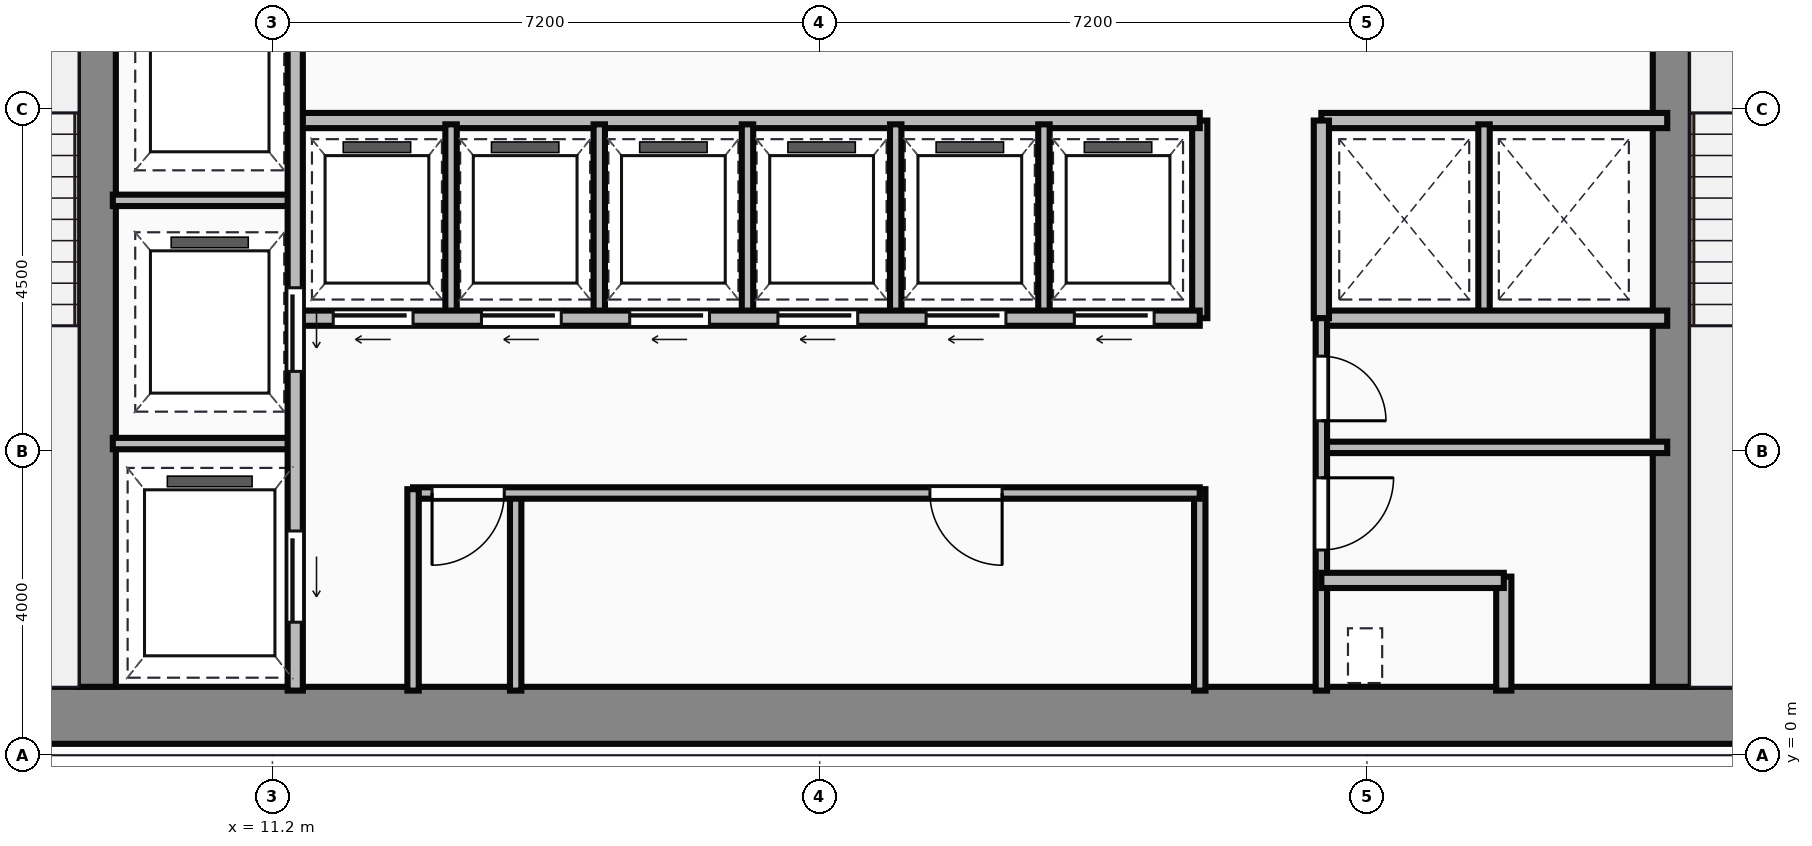
"""IFC4 building model, lengths in metres.
Left out: names, types, materials, properties, quantities, classifications, styles, units other than length and angle.
Written with IfcOpenShell. Run it as: python <this file> out.ifc"""

import sys

from ifc_helpers import new_model, si_unit, direction, frame, frame_2d, origin, place, context, subcontext, project, spatial, rectangle, extrude, source, transform, mapped, element, fill, save


model = new_model("IFC4")
c1 = context("Model", 3, precision=1e-05, world=origin(), true_north=direction((0.0, 1.0)))
c2 = subcontext(c1, "Body", "Model", "MODEL_VIEW")
j1 = project(units=[si_unit("LENGTHUNIT", "METRE"), si_unit("PLANEANGLEUNIT", "RADIAN")], contexts=[c1])
p1 = place(None, origin())
s1 = spatial("IfcSite", under=j1, at=p1, CompositionType="ELEMENT")
p2 = place(p1, origin())
s2 = spatial("IfcBuilding", under=s1, at=p2, CompositionType="ELEMENT")
p3 = place(p2, frame((0.0, 0.0, 117.85)))
s3 = spatial("IfcBuildingStorey", under=s2, at=p3, CompositionType="ELEMENT", Elevation=117.85)
m1 = source(origin(), c2, "Body", "SweptSolid", [
    extrude(rectangle(XDim=29.5, YDim=0.75, at=frame_2d((14.75, 0.0))), origin(), (0.0, 0.0, 1.0), 3.65),
])
p4 = place(p3, frame((4.5, 0.525, 0.0), z_axis=(0.0, 0.0, 1.0), x_axis=(1.0, 0.0, 0.0)))
e1 = element("IfcWall", 1, at=p4, inside=s3, PredefinedType="SHEAR", context=c2, shape_type="MappedRepresentation", body=[
    mapped(m1, transform((0.0, 0.0, 0.0))),
])
m2 = source(origin(), c2, "Body", "SweptSolid", [
    extrude(rectangle(XDim=12.35, YDim=0.5, at=frame_2d((6.175, 0.0))), origin(), (0.0, 0.0, 1.0), 3.65),
])
for number, where, z_axis, x_axis in (
    (2, (8.89, 0.9, 0.0), (0.0, 0.0, 1.0), (0.0, 1.0, 0.0)),
    (3, (29.61, 0.9, 0.0), (0.0, 0.0, 1.0), (0.0, 1.0, 0.0)),
):
    element("IfcWall", number, at=place(p3, frame(where, z_axis=z_axis, x_axis=x_axis)), inside=s3, PredefinedType="SHEAR", context=c2, shape_type="MappedRepresentation", body=[
        mapped(m2, transform((0.0, 0.0, 0.0))),
    ])
m3 = source(origin(), c2, "Body", "SweptSolid", [
    extrude(rectangle(XDim=9.6, YDim=0.2, at=frame_2d((4.8, 0.0))), origin(), (0.0, 0.0, 1.0), 3.4),
])
p5 = place(p3, frame((11.5, 0.85, 0.0), z_axis=(0.0, 0.0, 1.0), x_axis=(0.0, 1.0, 0.0)))
e4 = element("IfcWall", 4, at=p5, inside=s3, PredefinedType="PARTITIONING", context=c2, shape_type="MappedRepresentation", body=[
    mapped(m3, transform((0.0, 0.0, 0.0))),
])
p6 = place(p5, frame((4.2, 0.0, 0.0)))
e5 = element("IfcOpeningElement", 5, at=p6, cuts=e4, PredefinedType="OPENING", context=c2, shape_type="SweptSolid", body=[
    extrude(rectangle(XDim=1.1, YDim=2.15, at=frame_2d((0.55, 1.075))), frame((0.0, 0.11, 0.0), z_axis=(0.0, -1.0, 0.0), x_axis=(1.0, 0.0, 0.0)), (0.0, 0.0, 1.0), 0.22),
])
p7 = place(p5, frame((0.9, 0.0, 0.0)))
e6 = element("IfcOpeningElement", 6, at=p7, cuts=e4, PredefinedType="OPENING", context=c2, shape_type="SweptSolid", body=[
    extrude(rectangle(XDim=1.2, YDim=2.15, at=frame_2d((0.6, 1.075))), frame((0.0, 0.11, 0.0), z_axis=(0.0, -1.0, 0.0), x_axis=(1.0, 0.0, 0.0)), (0.0, 0.0, 1.0), 0.22),
])
m4 = source(origin(), c2, "Body", "SweptSolid", [
    extrude(rectangle(XDim=2.4, YDim=0.15, at=frame_2d((1.2, 0.0))), origin(), (0.0, 0.0, 1.0), 3.4),
])
for number, where, z_axis, x_axis in (
    (7, (9.1, 4.1, 0.0), (0.0, 0.0, 1.0), (1.0, 0.0, 0.0)),
    (8, (9.1, 7.3, 0.0), (0.0, 0.0, 1.0), (1.0, 0.0, 0.0)),
):
    element("IfcWall", number, at=place(p3, frame(where, z_axis=z_axis, x_axis=x_axis)), inside=s3, PredefinedType="PARTITIONING", context=c2, shape_type="MappedRepresentation", body=[
        mapped(m4, transform((0.0, 0.0, 0.0))),
    ])
m5 = source(origin(), c2, "Body", "SweptSolid", [
    extrude(rectangle(XDim=2.65, YDim=0.15, at=frame_2d((1.325, 0.0))), origin(), (0.0, 0.0, 1.0), 3.4),
])
p8 = place(p3, frame((13.05, 0.85, 0.0), z_axis=(0.0, 0.0, 1.0), x_axis=(0.0, 1.0, 0.0)))
e9 = element("IfcWall", 9, at=p8, inside=s3, PredefinedType="PARTITIONING", context=c2, shape_type="MappedRepresentation", body=[
    mapped(m5, transform((0.0, 0.0, 0.0))),
])
m6 = source(origin(), c2, "Body", "SweptSolid", [
    extrude(rectangle(XDim=10.35, YDim=0.15, at=frame_2d((5.175, 0.0))), origin(), (0.0, 0.0, 1.0), 3.4),
])
p9 = place(p3, frame((13.05, 3.45, 0.0), z_axis=(0.0, 0.0, 1.0), x_axis=(1.0, 0.0, 0.0)))
e10 = element("IfcWall", 10, at=p9, inside=s3, PredefinedType="PARTITIONING", context=c2, shape_type="MappedRepresentation", body=[
    mapped(m6, transform((0.0, 0.0, 0.0))),
])
p10 = place(p9, frame((0.25, 0.0, 0.0)))
e11 = element("IfcOpeningElement", 11, at=p10, cuts=e10, PredefinedType="OPENING", context=c2, shape_type="SweptSolid", body=[
    extrude(rectangle(XDim=0.95, YDim=2.15, at=frame_2d((0.475, 1.075))), frame((0.0, 0.085, 0.0), z_axis=(0.0, -1.0, 0.0), x_axis=(1.0, 0.0, 0.0)), (0.0, 0.0, 1.0), 0.17),
])
p11 = place(p9, frame((6.8, 0.0, 0.0)))
e12 = element("IfcOpeningElement", 12, at=p11, cuts=e10, PredefinedType="OPENING", context=c2, shape_type="SweptSolid", body=[
    extrude(rectangle(XDim=0.95, YDim=2.15, at=frame_2d((0.475, 1.075))), frame((0.0, 0.085, 0.0), z_axis=(0.0, -1.0, 0.0), x_axis=(1.0, 0.0, 0.0)), (0.0, 0.0, 1.0), 0.17),
])
p12 = place(p3, frame((23.4, 0.85, 0.0), z_axis=(0.0, 0.0, 1.0), x_axis=(0.0, 1.0, 0.0)))
e13 = element("IfcWall", 13, at=p12, inside=s3, PredefinedType="PARTITIONING", context=c2, shape_type="MappedRepresentation", body=[
    mapped(m5, transform((0.0, 0.0, 0.0))),
])
m7 = source(origin(), c2, "Body", "SweptSolid", [
    extrude(rectangle(XDim=2.6, YDim=0.15, at=frame_2d((1.3, 0.0))), origin(), (0.0, 0.0, 1.0), 3.4),
])
p13 = place(p3, frame((14.4, 0.85, 0.0), z_axis=(0.0, 0.0, 1.0), x_axis=(0.0, 1.0, 0.0)))
e14 = element("IfcWall", 14, at=p13, inside=s3, PredefinedType="PARTITIONING", context=c2, shape_type="MappedRepresentation", body=[
    mapped(m7, transform((0.0, 0.0, 0.0))),
])
m8 = source(origin(), c2, "Body", "SweptSolid", [
    extrude(rectangle(XDim=11.85, YDim=0.2, at=frame_2d((5.925, 0.0))), origin(), (0.0, 0.0, 1.0), 3.4),
])
p14 = place(p3, frame((11.55, 5.75, 0.0), z_axis=(0.0, 0.0, 1.0), x_axis=(1.0, 0.0, 0.0)))
e15 = element("IfcWall", 15, at=p14, inside=s3, PredefinedType="PARTITIONING", context=c2, shape_type="MappedRepresentation", body=[
    mapped(m8, transform((0.0, 0.0, 0.0))),
])
p15 = place(p14, frame((0.45, 0.0, 0.0)))
e16 = element("IfcOpeningElement", 16, at=p15, cuts=e15, PredefinedType="OPENING", context=c2, shape_type="SweptSolid", body=[
    extrude(rectangle(XDim=1.05, YDim=2.15, at=frame_2d((0.525, 1.075))), frame((0.0, 0.11, 0.0), z_axis=(0.0, -1.0, 0.0), x_axis=(1.0, 0.0, 0.0)), (0.0, 0.0, 1.0), 0.22),
])
p16 = place(p14, frame((2.4, 0.0, 0.0)))
e17 = element("IfcOpeningElement", 17, at=p16, cuts=e15, PredefinedType="OPENING", context=c2, shape_type="SweptSolid", body=[
    extrude(rectangle(XDim=1.05, YDim=2.15, at=frame_2d((0.525, 1.075))), frame((0.0, 0.11, 0.0), z_axis=(0.0, -1.0, 0.0), x_axis=(1.0, 0.0, 0.0)), (0.0, 0.0, 1.0), 0.22),
])
p17 = place(p14, frame((4.35, 0.0, 0.0)))
e18 = element("IfcOpeningElement", 18, at=p17, cuts=e15, PredefinedType="OPENING", context=c2, shape_type="SweptSolid", body=[
    extrude(rectangle(XDim=1.05, YDim=2.15, at=frame_2d((0.525, 1.075))), frame((0.0, 0.11, 0.0), z_axis=(0.0, -1.0, 0.0), x_axis=(1.0, 0.0, 0.0)), (0.0, 0.0, 1.0), 0.22),
])
p18 = place(p14, frame((6.3, 0.0, 0.0)))
e19 = element("IfcOpeningElement", 19, at=p18, cuts=e15, PredefinedType="OPENING", context=c2, shape_type="SweptSolid", body=[
    extrude(rectangle(XDim=1.05, YDim=2.15, at=frame_2d((0.525, 1.075))), frame((0.0, 0.11, 0.0), z_axis=(0.0, -1.0, 0.0), x_axis=(1.0, 0.0, 0.0)), (0.0, 0.0, 1.0), 0.22),
])
p19 = place(p14, frame((8.25, 0.0, 0.0)))
e20 = element("IfcOpeningElement", 20, at=p19, cuts=e15, PredefinedType="OPENING", context=c2, shape_type="SweptSolid", body=[
    extrude(rectangle(XDim=1.05, YDim=2.15, at=frame_2d((0.525, 1.075))), frame((0.0, 0.11, 0.0), z_axis=(0.0, -1.0, 0.0), x_axis=(1.0, 0.0, 0.0)), (0.0, 0.0, 1.0), 0.22),
])
p20 = place(p14, frame((10.2, 0.0, 0.0)))
e21 = element("IfcOpeningElement", 21, at=p20, cuts=e15, PredefinedType="OPENING", context=c2, shape_type="SweptSolid", body=[
    extrude(rectangle(XDim=1.05, YDim=2.15, at=frame_2d((0.525, 1.075))), frame((0.0, 0.11, 0.0), z_axis=(0.0, -1.0, 0.0), x_axis=(1.0, 0.0, 0.0)), (0.0, 0.0, 1.0), 0.22),
])
p21 = place(p3, frame((11.55, 8.35, 0.0), z_axis=(0.0, 0.0, 1.0), x_axis=(1.0, 0.0, 0.0)))
e22 = element("IfcWall", 22, at=p21, inside=s3, PredefinedType="PARTITIONING", context=c2, shape_type="MappedRepresentation", body=[
    mapped(m8, transform((0.0, 0.0, 0.0))),
])
m9 = source(origin(), c2, "Body", "SweptSolid", [
    extrude(rectangle(XDim=2.6, YDim=0.2, at=frame_2d((1.3, 0.0))), origin(), (0.0, 0.0, 1.0), 3.4),
])
p22 = place(p3, frame((23.4, 5.75, 0.0), z_axis=(0.0, 0.0, 1.0), x_axis=(0.0, 1.0, 0.0)))
e23 = element("IfcWall", 23, at=p22, inside=s3, PredefinedType="PARTITIONING", context=c2, shape_type="MappedRepresentation", body=[
    mapped(m9, transform((0.0, 0.0, 0.0))),
])
m10 = source(origin(), c2, "Body", "SweptSolid", [
    extrude(rectangle(XDim=2.5, YDim=0.15, at=frame_2d((1.25, 0.0))), origin(), (0.0, 0.0, 1.0), 3.4),
])
for number, where, z_axis, x_axis in (
    (24, (13.55, 5.8, 0.0), (0.0, 0.0, 1.0), (0.0, 1.0, 0.0)),
    (25, (15.5, 5.8, 0.0), (0.0, 0.0, 1.0), (0.0, 1.0, 0.0)),
    (26, (17.45, 5.8, 0.0), (0.0, 0.0, 1.0), (0.0, 1.0, 0.0)),
    (27, (19.4, 5.8, 0.0), (0.0, 0.0, 1.0), (0.0, 1.0, 0.0)),
    (28, (21.35, 5.8, 0.0), (0.0, 0.0, 1.0), (0.0, 1.0, 0.0)),
):
    element("IfcWall", number, at=place(p3, frame(where, z_axis=z_axis, x_axis=x_axis)), inside=s3, PredefinedType="PARTITIONING", context=c2, shape_type="MappedRepresentation", body=[
        mapped(m10, transform((0.0, 0.0, 0.0))),
    ])
m11 = source(origin(), c2, "Body", "SweptSolid", [
    extrude(rectangle(XDim=4.55, YDim=0.2, at=frame_2d((2.275, 0.0))), origin(), (0.0, 0.0, 1.0), 3.4),
])
for number, where, z_axis, x_axis in (
    (29, (25.0, 8.35, 0.0), (0.0, 0.0, 1.0), (1.0, 0.0, 0.0)),
    (30, (25.0, 5.75, 0.0), (0.0, 0.0, 1.0), (1.0, 0.0, 0.0)),
):
    element("IfcWall", number, at=place(p3, frame(where, z_axis=z_axis, x_axis=x_axis)), inside=s3, PredefinedType="PARTITIONING", context=c2, shape_type="MappedRepresentation", body=[
        mapped(m11, transform((0.0, 0.0, 0.0))),
    ])
p23 = place(p3, frame((25.0, 5.75, 0.0), z_axis=(0.0, 0.0, 1.0), x_axis=(0.0, 1.0, 0.0)))
e31 = element("IfcWall", 31, at=p23, inside=s3, PredefinedType="PARTITIONING", context=c2, shape_type="MappedRepresentation", body=[
    mapped(m9, transform((0.0, 0.0, 0.0))),
])
p24 = place(p3, frame((27.14, 5.8, 0.0), z_axis=(0.0, 0.0, 1.0), x_axis=(0.0, 1.0, 0.0)))
e32 = element("IfcWall", 32, at=p24, inside=s3, PredefinedType="PARTITIONING", context=c2, shape_type="MappedRepresentation", body=[
    mapped(m10, transform((0.0, 0.0, 0.0))),
])
m12 = source(origin(), c2, "Body", "SweptSolid", [
    extrude(rectangle(XDim=4.9, YDim=0.15, at=frame_2d((2.45, 0.0))), origin(), (0.0, 0.0, 1.0), 3.4),
])
p25 = place(p3, frame((25.0, 0.85, 0.0), z_axis=(0.0, 0.0, 1.0), x_axis=(0.0, 1.0, 0.0)))
e33 = element("IfcWall", 33, at=p25, inside=s3, PredefinedType="PARTITIONING", context=c2, shape_type="MappedRepresentation", body=[
    mapped(m12, transform((0.0, 0.0, 0.0))),
])
p26 = place(p25, frame((1.85, 0.0, 0.0)))
e34 = element("IfcOpeningElement", 34, at=p26, cuts=e33, PredefinedType="OPENING", context=c2, shape_type="SweptSolid", body=[
    extrude(rectangle(XDim=0.95, YDim=2.15, at=frame_2d((0.475, 1.075))), frame((0.0, 0.085, 0.0), z_axis=(0.0, -1.0, 0.0), x_axis=(1.0, 0.0, 0.0)), (0.0, 0.0, 1.0), 0.17),
])
p27 = place(p25, frame((3.55, 0.0, 0.0)))
e35 = element("IfcOpeningElement", 35, at=p27, cuts=e33, PredefinedType="OPENING", context=c2, shape_type="SweptSolid", body=[
    extrude(rectangle(XDim=0.85, YDim=2.15, at=frame_2d((0.425, 1.075))), frame((0.0, 0.085, 0.0), z_axis=(0.0, -1.0, 0.0), x_axis=(1.0, 0.0, 0.0)), (0.0, 0.0, 1.0), 0.17),
])
m13 = source(origin(), c2, "Body", "SweptSolid", [
    extrude(rectangle(XDim=2.4, YDim=0.2, at=frame_2d((1.2, 0.0))), origin(), (0.0, 0.0, 1.0), 3.4),
])
p28 = place(p3, frame((25.0, 2.3, 0.0), z_axis=(0.0, 0.0, 1.0), x_axis=(1.0, 0.0, 0.0)))
e36 = element("IfcWall", 36, at=p28, inside=s3, PredefinedType="PARTITIONING", context=c2, shape_type="MappedRepresentation", body=[
    mapped(m13, transform((0.0, 0.0, 0.0))),
])
m14 = source(origin(), c2, "Body", "SweptSolid", [
    extrude(rectangle(XDim=1.5, YDim=0.2, at=frame_2d((0.75, 0.0))), origin(), (0.0, 0.0, 1.0), 3.4),
])
p29 = place(p3, frame((27.4, 0.85, 0.0), z_axis=(0.0, 0.0, 1.0), x_axis=(0.0, 1.0, 0.0)))
e37 = element("IfcWall", 37, at=p29, inside=s3, PredefinedType="PARTITIONING", context=c2, shape_type="MappedRepresentation", body=[
    mapped(m14, transform((0.0, 0.0, 0.0))),
])
m15 = source(origin(), c2, "Body", "SweptSolid", [
    extrude(rectangle(XDim=4.55, YDim=0.15, at=frame_2d((2.275, 0.0))), origin(), (0.0, 0.0, 1.0), 3.4),
])
p30 = place(p3, frame((25.0, 4.05, 0.0), z_axis=(0.0, 0.0, 1.0), x_axis=(1.0, 0.0, 0.0)))
e38 = element("IfcWall", 38, at=p30, inside=s3, PredefinedType="PARTITIONING", context=c2, shape_type="MappedRepresentation", body=[
    mapped(m15, transform((0.0, 0.0, 0.0))),
])
m16 = source(origin(), c2, "Body", "SweptSolid", [
    extrude(rectangle(XDim=1.1, YDim=2.15, at=frame_2d((0.55, 1.075))), frame((0.0, 0.025, 0.0), z_axis=(0.0, -1.0, 0.0), x_axis=(1.0, 0.0, 0.0)), (0.0, 0.0, 1.0), 0.05),
])
p31 = place(p6, frame((1.1, 0.0, 0.0), z_axis=(0.0, 0.0, 1.0), x_axis=(-1.0, 0.0, 0.0)))
e39 = element("IfcDoor", 39, at=p31, inside=s3, OperationType="SLIDING_TO_LEFT", PredefinedType="DOOR", context=c2, shape_type="MappedRepresentation", body=[
    mapped(m16, transform((0.0, 0.0, 0.0))),
])
fill(e5, e39)
m17 = source(origin(), c2, "Body", "SweptSolid", [
    extrude(rectangle(XDim=1.2, YDim=2.15, at=frame_2d((0.6, 1.075))), frame((0.0, 0.025, 0.0), z_axis=(0.0, -1.0, 0.0), x_axis=(1.0, 0.0, 0.0)), (0.0, 0.0, 1.0), 0.05),
])
p32 = place(p7, frame((1.2, 0.0, 0.0), z_axis=(0.0, 0.0, 1.0), x_axis=(-1.0, 0.0, 0.0)))
e40 = element("IfcDoor", 40, at=p32, inside=s3, OperationType="SLIDING_TO_LEFT", PredefinedType="DOOR", context=c2, shape_type="MappedRepresentation", body=[
    mapped(m17, transform((0.0, 0.0, 0.0))),
])
fill(e6, e40)
m18 = source(origin(), c2, "Body", "SweptSolid", [
    extrude(rectangle(XDim=0.95, YDim=2.15, at=frame_2d((0.475, 1.075))), frame((0.0, 0.025, 0.0), z_axis=(0.0, -1.0, 0.0), x_axis=(1.0, 0.0, 0.0)), (0.0, 0.0, 1.0), 0.05),
])
p33 = place(p10, origin())
e41 = element("IfcDoor", 41, at=p33, inside=s3, OperationType="SINGLE_SWING_LEFT", PredefinedType="DOOR", context=c2, shape_type="MappedRepresentation", body=[
    mapped(m18, transform((0.0, 0.0, 0.0))),
])
fill(e11, e41)
p34 = place(p11, origin())
e42 = element("IfcDoor", 42, at=p34, inside=s3, OperationType="SINGLE_SWING_RIGHT", PredefinedType="DOOR", context=c2, shape_type="MappedRepresentation", body=[
    mapped(m18, transform((0.0, 0.0, 0.0))),
])
fill(e12, e42)
m19 = source(origin(), c2, "Body", "SweptSolid", [
    extrude(rectangle(XDim=1.05, YDim=2.15, at=frame_2d((0.525, 1.075))), frame((0.0, 0.025, 0.0), z_axis=(0.0, -1.0, 0.0), x_axis=(1.0, 0.0, 0.0)), (0.0, 0.0, 1.0), 0.05),
])
p35 = place(p15, frame((1.05, 0.0, 0.0), z_axis=(0.0, 0.0, 1.0), x_axis=(-1.0, 0.0, 0.0)))
e43 = element("IfcDoor", 43, at=p35, inside=s3, OperationType="SLIDING_TO_LEFT", PredefinedType="DOOR", context=c2, shape_type="MappedRepresentation", body=[
    mapped(m19, transform((0.0, 0.0, 0.0))),
])
fill(e16, e43)
p36 = place(p16, frame((1.05, 0.0, 0.0), z_axis=(0.0, 0.0, 1.0), x_axis=(-1.0, 0.0, 0.0)))
e44 = element("IfcDoor", 44, at=p36, inside=s3, OperationType="SLIDING_TO_LEFT", PredefinedType="DOOR", context=c2, shape_type="MappedRepresentation", body=[
    mapped(m19, transform((0.0, 0.0, 0.0))),
])
fill(e17, e44)
p37 = place(p17, frame((1.05, 0.0, 0.0), z_axis=(0.0, 0.0, 1.0), x_axis=(-1.0, 0.0, 0.0)))
e45 = element("IfcDoor", 45, at=p37, inside=s3, OperationType="SLIDING_TO_LEFT", PredefinedType="DOOR", context=c2, shape_type="MappedRepresentation", body=[
    mapped(m19, transform((0.0, 0.0, 0.0))),
])
fill(e18, e45)
p38 = place(p18, frame((1.05, 0.0, 0.0), z_axis=(0.0, 0.0, 1.0), x_axis=(-1.0, 0.0, 0.0)))
e46 = element("IfcDoor", 46, at=p38, inside=s3, OperationType="SLIDING_TO_LEFT", PredefinedType="DOOR", context=c2, shape_type="MappedRepresentation", body=[
    mapped(m19, transform((0.0, 0.0, 0.0))),
])
fill(e19, e46)
p39 = place(p19, frame((1.05, 0.0, 0.0), z_axis=(0.0, 0.0, 1.0), x_axis=(-1.0, 0.0, 0.0)))
e47 = element("IfcDoor", 47, at=p39, inside=s3, OperationType="SLIDING_TO_LEFT", PredefinedType="DOOR", context=c2, shape_type="MappedRepresentation", body=[
    mapped(m19, transform((0.0, 0.0, 0.0))),
])
fill(e20, e47)
p40 = place(p20, frame((1.05, 0.0, 0.0), z_axis=(0.0, 0.0, 1.0), x_axis=(-1.0, 0.0, 0.0)))
e48 = element("IfcDoor", 48, at=p40, inside=s3, OperationType="SLIDING_TO_LEFT", PredefinedType="DOOR", context=c2, shape_type="MappedRepresentation", body=[
    mapped(m19, transform((0.0, 0.0, 0.0))),
])
fill(e21, e48)
p41 = place(p26, origin())
e49 = element("IfcDoor", 49, at=p41, inside=s3, OperationType="SINGLE_SWING_RIGHT", PredefinedType="DOOR", context=c2, shape_type="MappedRepresentation", body=[
    mapped(m18, transform((0.0, 0.0, 0.0))),
])
fill(e34, e49)
m20 = source(origin(), c2, "Body", "SweptSolid", [
    extrude(rectangle(XDim=0.85, YDim=2.15, at=frame_2d((0.425, 1.075))), frame((0.0, 0.025, 0.0), z_axis=(0.0, -1.0, 0.0), x_axis=(1.0, 0.0, 0.0)), (0.0, 0.0, 1.0), 0.05),
])
p42 = place(p27, origin())
e50 = element("IfcDoor", 50, at=p42, inside=s3, OperationType="SINGLE_SWING_LEFT", PredefinedType="DOOR", context=c2, shape_type="MappedRepresentation", body=[
    mapped(m20, transform((0.0, 0.0, 0.0))),
])
fill(e35, e50)
save(model, sys.argv[1])
